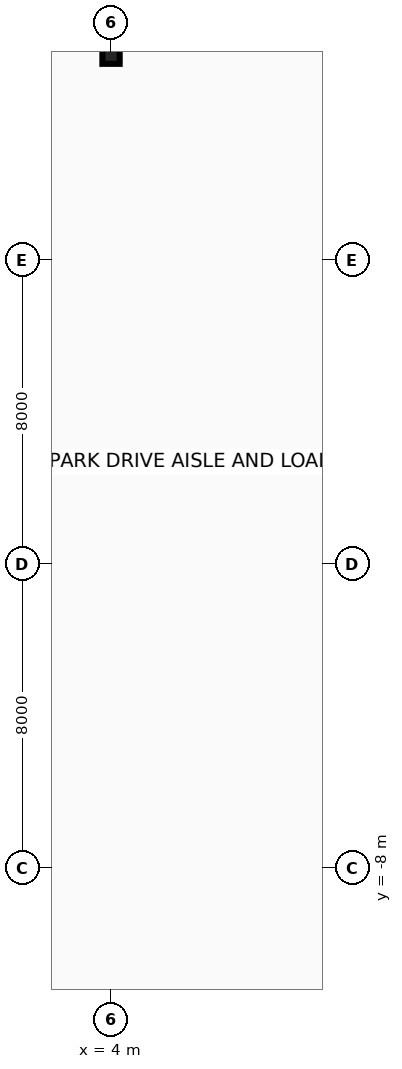
"""IFC4 building model, lengths in metres.
Left out: names, types, materials, properties, quantities, classifications, styles, units other than length and angle.
Written with IfcOpenShell. Run it as: python <this file> out.ifc"""

import sys

from ifc_helpers import new_model, si_unit, direction, frame, origin, origin_2d, place, context, subcontext, project, spatial, i_section, extrude, source, transform, mapped, element, save


model = new_model("IFC4")
c1 = context("Model", 3, precision=1e-05, world=origin(), true_north=direction((0.0, 1.0)))
c2 = subcontext(c1, "Body", "Model", "MODEL_VIEW")
j1 = project(units=[si_unit("LENGTHUNIT", "METRE"), si_unit("PLANEANGLEUNIT", "RADIAN")], contexts=[c1])
p1 = place(None, origin())
s1 = spatial("IfcSite", under=j1, at=p1, CompositionType="ELEMENT")
p2 = place(p1, origin())
s2 = spatial("IfcBuilding", under=s1, at=p2, CompositionType="ELEMENT")
p3 = place(p2, frame((0.0, 0.0, -4.8)))
s3 = spatial("IfcBuildingStorey", under=s2, at=p3, CompositionType="ELEMENT", Elevation=-4.8)
m1 = source(origin(), c2, "Body", "SweptSolid", [
    extrude(i_section(OverallWidth=0.454, OverallDepth=0.569, WebThickness=0.078, FlangeThickness=0.125, at=origin_2d()), origin(), (0.0, 0.0, 1.0), 4.8),
])
p4 = place(p3, frame((4.0, 13.45, 0.0), z_axis=(0.0, 0.0, 1.0), x_axis=(1.0, 0.0, 0.0)))
e1 = element("IfcColumn", 1, at=p4, inside=s3, PredefinedType="COLUMN", context=c2, shape_type="MappedRepresentation", body=[
    mapped(m1, transform((0.0, 0.0, 0.0), x_axis=(1.0, 0.0, 0.0), y_axis=(0.0, 1.0, 0.0), z_axis=(0.0, 0.0, 1.0), scale=1.0)),
])
save(model, sys.argv[1])
